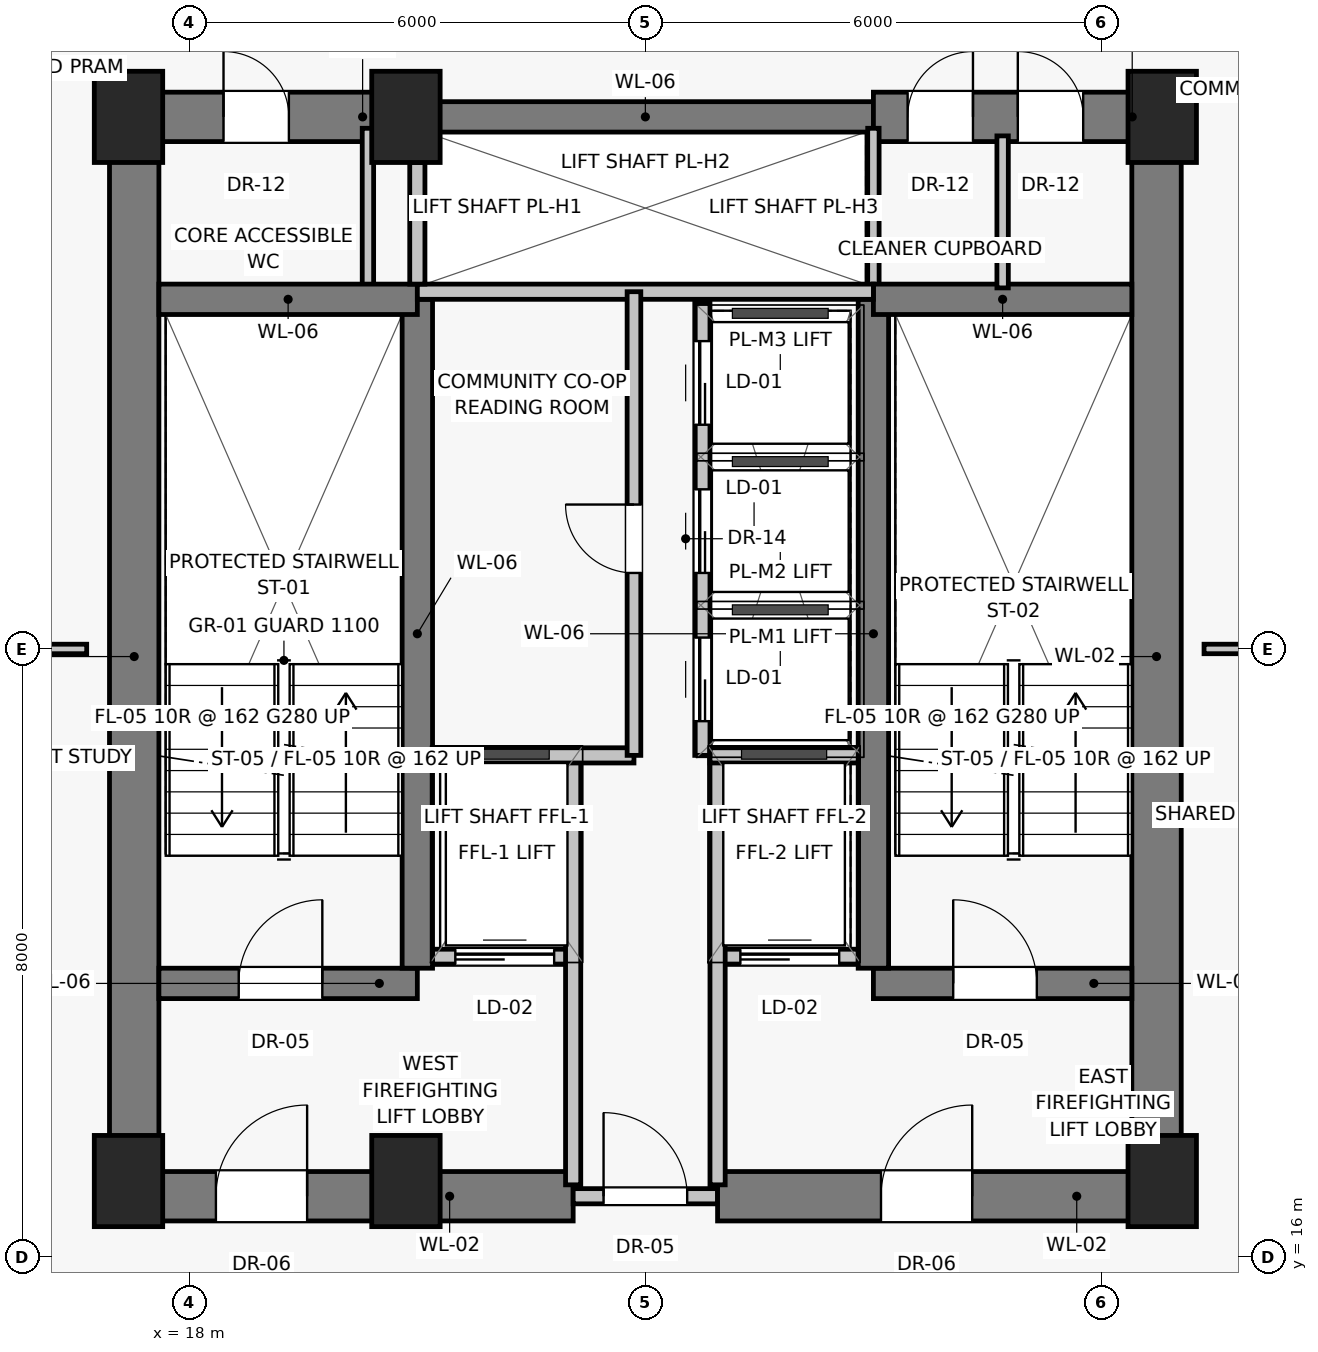
"""IFC4 building model, lengths in metres.
Left out: names, types, materials, properties, quantities, classifications, styles, units other than length and angle.
Written with IfcOpenShell. Run it as: python <this file> out.ifc"""

import sys

from ifc_helpers import new_model, si_unit, direction, frame, frame_2d, origin, origin_2d, place, context, subcontext, project, spatial, rectangle, extrude, source, transform, mapped, element, fill, save


model = new_model("IFC4")
c1 = context("Model", 3, precision=1e-05, world=origin(), true_north=direction((0.0, 1.0)))
c2 = subcontext(c1, "Body", "Model", "MODEL_VIEW")
j1 = project(units=[si_unit("LENGTHUNIT", "METRE"), si_unit("PLANEANGLEUNIT", "RADIAN")], contexts=[c1])
p1 = place(None, origin())
s1 = spatial("IfcSite", under=j1, at=p1, CompositionType="ELEMENT")
p2 = place(p1, origin())
s2 = spatial("IfcBuilding", under=s1, at=p2, CompositionType="ELEMENT")
p3 = place(p2, frame((0.0, 0.0, 163.05)))
s3 = spatial("IfcBuildingStorey", under=s2, at=p3, CompositionType="ELEMENT", Elevation=163.05)
for number, where, z_axis, x_axis in (
    (1, (17.2, 17.0, 0.0), (0.0, 0.0, 1.0), (1.0, 0.0, 0.0)),
    (2, (20.85, 17.0, 0.0), (0.0, 0.0, 1.0), (1.0, 0.0, 0.0)),
    (3, (30.8, 17.0, 0.0), (0.0, 0.0, 1.0), (1.0, 0.0, 0.0)),
    (4, (17.2, 31.0, 0.0), (0.0, 0.0, 1.0), (1.0, 0.0, 0.0)),
    (5, (20.85, 31.0, 0.0), (0.0, 0.0, 1.0), (1.0, 0.0, 0.0)),
    (6, (30.8, 31.0, 0.0), (0.0, 0.0, 1.0), (1.0, 0.0, 0.0)),
):
    element("IfcColumn", number, at=place(p3, frame(where, z_axis=z_axis, x_axis=x_axis)), inside=s3, PredefinedType="PILASTER", context=c2, shape_type="SweptSolid", body=[
        extrude(rectangle(XDim=0.9, YDim=1.2, at=origin_2d()), origin(), (0.0, 0.0, 1.0), 3.25),
    ])
for number, where, z_axis, x_axis in (
    (7, (17.275, 16.8, 0.0), (0.0, 0.0, 1.0), (0.0, 1.0, 0.0)),
    (8, (30.725, 16.8, 0.0), (0.0, 0.0, 1.0), (0.0, 1.0, 0.0)),
):
    element("IfcWall", number, at=place(p3, frame(where, z_axis=z_axis, x_axis=x_axis)), inside=s3, PredefinedType="SHEAR", context=c2, shape_type="SweptSolid", body=[
        extrude(rectangle(XDim=14.2, YDim=0.65, at=frame_2d((7.1, 0.0))), origin(), (0.0, 0.0, 1.0), 3.0),
    ])
p4 = place(p3, frame((17.2, 16.8, 0.0), z_axis=(0.0, 0.0, 1.0), x_axis=(1.0, 0.0, 0.0)))
e9 = element("IfcWall", 9, at=p4, inside=s3, PredefinedType="SHEAR", context=c2, shape_type="SweptSolid", body=[
    extrude(rectangle(XDim=5.85, YDim=0.65, at=frame_2d((2.925, 0.0))), origin(), (0.0, 0.0, 1.0), 3.0),
])
p5 = place(p4, frame((1.15, 0.0, 0.0)))
e10 = element("IfcOpeningElement", 10, at=p5, cuts=e9, PredefinedType="OPENING", context=c2, shape_type="SweptSolid", body=[
    extrude(rectangle(XDim=1.2, YDim=2.03, at=frame_2d((0.6, 1.015))), frame((0.0, 0.335, 0.0), z_axis=(0.0, -1.0, 0.0), x_axis=(1.0, 0.0, 0.0)), (0.0, 0.0, 1.0), 0.67),
])
p6 = place(p3, frame((23.05, 16.8, 0.0), z_axis=(0.0, 0.0, 1.0), x_axis=(1.0, 0.0, 0.0)))
e11 = element("IfcWall", 11, at=p6, inside=s3, PredefinedType="SOLIDWALL", context=c2, shape_type="SweptSolid", body=[
    extrude(rectangle(XDim=1.9, YDim=0.2, at=frame_2d((0.95, 0.0))), origin(), (0.0, 0.0, 1.0), 2.15),
])
p7 = place(p6, frame((0.4, 0.0, 0.0)))
e12 = element("IfcOpeningElement", 12, at=p7, cuts=e11, PredefinedType="OPENING", context=c2, shape_type="SweptSolid", body=[
    extrude(rectangle(XDim=1.1, YDim=2.03, at=frame_2d((0.55, 1.015))), frame((0.0, 0.11, 0.0), z_axis=(0.0, -1.0, 0.0), x_axis=(1.0, 0.0, 0.0)), (0.0, 0.0, 1.0), 0.22),
])
p8 = place(p3, frame((24.95, 16.8, 0.0), z_axis=(0.0, 0.0, 1.0), x_axis=(1.0, 0.0, 0.0)))
e13 = element("IfcWall", 13, at=p8, inside=s3, PredefinedType="SHEAR", context=c2, shape_type="SweptSolid", body=[
    extrude(rectangle(XDim=5.85, YDim=0.65, at=frame_2d((2.925, 0.0))), origin(), (0.0, 0.0, 1.0), 3.0),
])
p9 = place(p8, frame((2.15, 0.0, 0.0)))
e14 = element("IfcOpeningElement", 14, at=p9, cuts=e13, PredefinedType="OPENING", context=c2, shape_type="SweptSolid", body=[
    extrude(rectangle(XDim=1.2, YDim=2.03, at=frame_2d((0.6, 1.015))), frame((0.0, 0.335, 0.0), z_axis=(0.0, -1.0, 0.0), x_axis=(1.0, 0.0, 0.0)), (0.0, 0.0, 1.0), 0.67),
])
p10 = place(p3, frame((17.2, 31.0, 0.0), z_axis=(0.0, 0.0, 1.0), x_axis=(1.0, 0.0, 0.0)))
e15 = element("IfcWall", 15, at=p10, inside=s3, PredefinedType="SHEAR", context=c2, shape_type="SweptSolid", body=[
    extrude(rectangle(XDim=3.8, YDim=0.65, at=frame_2d((1.9, 0.0))), origin(), (0.0, 0.0, 1.0), 3.0),
])
p11 = place(p10, frame((1.25, 0.0, 0.0)))
e16 = element("IfcOpeningElement", 16, at=p11, cuts=e15, PredefinedType="OPENING", context=c2, shape_type="SweptSolid", body=[
    extrude(rectangle(XDim=0.86, YDim=2.01, at=frame_2d((0.43, 1.005))), frame((0.0, 0.335, 0.0), z_axis=(0.0, -1.0, 0.0), x_axis=(1.0, 0.0, 0.0)), (0.0, 0.0, 1.0), 0.67),
])
p12 = place(p3, frame((21.0, 31.0, 0.0), z_axis=(0.0, 0.0, 1.0), x_axis=(1.0, 0.0, 0.0)))
e17 = element("IfcWall", 17, at=p12, inside=s3, PredefinedType="SHEAR", context=c2, shape_type="SweptSolid", body=[
    extrude(rectangle(XDim=6.0, YDim=0.4, at=frame_2d((3.0, 0.0))), origin(), (0.0, 0.0, 1.0), 3.0),
])
p13 = place(p3, frame((27.0, 31.0, 0.0), z_axis=(0.0, 0.0, 1.0), x_axis=(1.0, 0.0, 0.0)))
e18 = element("IfcWall", 18, at=p13, inside=s3, PredefinedType="SHEAR", context=c2, shape_type="SweptSolid", body=[
    extrude(rectangle(XDim=3.8, YDim=0.65, at=frame_2d((1.9, 0.0))), origin(), (0.0, 0.0, 1.0), 3.0),
])
p14 = place(p13, frame((0.45, 0.0, 0.0)))
e19 = element("IfcOpeningElement", 19, at=p14, cuts=e18, PredefinedType="OPENING", context=c2, shape_type="SweptSolid", body=[
    extrude(rectangle(XDim=0.86, YDim=2.01, at=frame_2d((0.43, 1.005))), frame((0.0, 0.335, 0.0), z_axis=(0.0, -1.0, 0.0), x_axis=(1.0, 0.0, 0.0)), (0.0, 0.0, 1.0), 0.67),
])
p15 = place(p13, frame((1.9, 0.0, 0.0)))
e20 = element("IfcOpeningElement", 20, at=p15, cuts=e18, PredefinedType="OPENING", context=c2, shape_type="SweptSolid", body=[
    extrude(rectangle(XDim=0.86, YDim=2.01, at=frame_2d((0.43, 1.005))), frame((0.0, 0.335, 0.0), z_axis=(0.0, -1.0, 0.0), x_axis=(1.0, 0.0, 0.0)), (0.0, 0.0, 1.0), 0.67),
])
for number, where, z_axis, x_axis in (
    (21, (20.35, 28.65, 0.0), (0.0, 0.0, 1.0), (0.0, 1.0, 0.0)),
    (22, (27.0, 28.65, 0.0), (0.0, 0.0, 1.0), (0.0, 1.0, 0.0)),
):
    element("IfcWall", number, at=place(p3, frame(where, z_axis=z_axis, x_axis=x_axis)), inside=s3, PredefinedType="PARTITIONING", context=c2, shape_type="SweptSolid", body=[
        extrude(rectangle(XDim=2.2, YDim=0.15, at=frame_2d((1.1, 0.0))), origin(), (0.0, 0.0, 1.0), 3.0),
    ])
p16 = place(p3, frame((17.6, 19.6, 0.0), z_axis=(0.0, 0.0, 1.0), x_axis=(1.0, 0.0, 0.0)))
e23 = element("IfcWall", 23, at=p16, inside=s3, PredefinedType="SHEAR", context=c2, shape_type="SweptSolid", body=[
    extrude(rectangle(XDim=3.4, YDim=0.4, at=frame_2d((1.7, 0.0))), origin(), (0.0, 0.0, 1.0), 3.0),
])
p17 = place(p16, frame((1.05, 0.0, 0.0)))
e24 = element("IfcOpeningElement", 24, at=p17, cuts=e23, PredefinedType="OPENING", context=c2, shape_type="SweptSolid", body=[
    extrude(rectangle(XDim=1.1, YDim=2.03, at=frame_2d((0.55, 1.015))), frame((0.0, 0.21, 0.0), z_axis=(0.0, -1.0, 0.0), x_axis=(1.0, 0.0, 0.0)), (0.0, 0.0, 1.0), 0.42),
])
p18 = place(p3, frame((21.2, 19.95, 0.0), z_axis=(0.0, 0.0, 1.0), x_axis=(1.0, 0.0, 0.0)))
e25 = element("IfcWall", 25, at=p18, inside=s3, PredefinedType="SOLIDWALL", context=c2, shape_type="SweptSolid", body=[
    extrude(rectangle(XDim=1.85, YDim=0.2, at=frame_2d((0.925, 0.0))), origin(), (0.0, 0.0, 1.0), 3.0),
])
p19 = place(p18, frame((0.3, 0.0, 0.0)))
e26 = element("IfcOpeningElement", 26, at=p19, cuts=e25, PredefinedType="OPENING", context=c2, shape_type="SweptSolid", body=[
    extrude(rectangle(XDim=1.3, YDim=2.25, at=frame_2d((0.65, 1.125))), frame((0.0, 0.11, 0.0), z_axis=(0.0, -1.0, 0.0), x_axis=(1.0, 0.0, 0.0)), (0.0, 0.0, 1.0), 0.22),
])
p20 = place(p3, frame((24.95, 19.95, 0.0), z_axis=(0.0, 0.0, 1.0), x_axis=(1.0, 0.0, 0.0)))
e27 = element("IfcWall", 27, at=p20, inside=s3, PredefinedType="SOLIDWALL", context=c2, shape_type="SweptSolid", body=[
    extrude(rectangle(XDim=1.85, YDim=0.2, at=frame_2d((0.925, 0.0))), origin(), (0.0, 0.0, 1.0), 3.0),
])
p21 = place(p20, frame((0.3, 0.0, 0.0)))
e28 = element("IfcOpeningElement", 28, at=p21, cuts=e27, PredefinedType="OPENING", context=c2, shape_type="SweptSolid", body=[
    extrude(rectangle(XDim=1.3, YDim=2.25, at=frame_2d((0.65, 1.125))), frame((0.0, 0.11, 0.0), z_axis=(0.0, -1.0, 0.0), x_axis=(1.0, 0.0, 0.0)), (0.0, 0.0, 1.0), 0.22),
])
p22 = place(p3, frame((27.0, 19.6, 0.0), z_axis=(0.0, 0.0, 1.0), x_axis=(1.0, 0.0, 0.0)))
e29 = element("IfcWall", 29, at=p22, inside=s3, PredefinedType="SHEAR", context=c2, shape_type="SweptSolid", body=[
    extrude(rectangle(XDim=3.4, YDim=0.4, at=frame_2d((1.7, 0.0))), origin(), (0.0, 0.0, 1.0), 3.0),
])
p23 = place(p22, frame((1.05, 0.0, 0.0)))
e30 = element("IfcOpeningElement", 30, at=p23, cuts=e29, PredefinedType="OPENING", context=c2, shape_type="SweptSolid", body=[
    extrude(rectangle(XDim=1.1, YDim=2.03, at=frame_2d((0.55, 1.015))), frame((0.0, 0.21, 0.0), z_axis=(0.0, -1.0, 0.0), x_axis=(1.0, 0.0, 0.0)), (0.0, 0.0, 1.0), 0.42),
])
for number, where, z_axis, x_axis in (
    (31, (21.0, 19.8, 0.0), (0.0, 0.0, 1.0), (0.0, 1.0, 0.0)),
    (32, (27.0, 19.8, 0.0), (0.0, 0.0, 1.0), (0.0, 1.0, 0.0)),
):
    element("IfcWall", number, at=place(p3, frame(where, z_axis=z_axis, x_axis=x_axis)), inside=s3, PredefinedType="SHEAR", context=c2, shape_type="SweptSolid", body=[
        extrude(rectangle(XDim=8.8, YDim=0.4, at=frame_2d((4.4, 0.0))), origin(), (0.0, 0.0, 1.0), 3.0),
    ])
for number, where, z_axis, x_axis in (
    (33, (17.6, 28.6, 0.0), (0.0, 0.0, 1.0), (1.0, 0.0, 0.0)),
    (34, (27.0, 28.6, 0.0), (0.0, 0.0, 1.0), (1.0, 0.0, 0.0)),
):
    element("IfcWall", number, at=place(p3, frame(where, z_axis=z_axis, x_axis=x_axis)), inside=s3, PredefinedType="SHEAR", context=c2, shape_type="SweptSolid", body=[
        extrude(rectangle(XDim=3.4, YDim=0.4, at=frame_2d((1.7, 0.0))), origin(), (0.0, 0.0, 1.0), 3.0),
    ])
for number, where, z_axis, x_axis in (
    (35, (23.05, 16.95, 0.0), (0.0, 0.0, 1.0), (0.0, 1.0, 0.0)),
    (36, (24.95, 16.95, 0.0), (0.0, 0.0, 1.0), (0.0, 1.0, 0.0)),
):
    element("IfcWall", number, at=place(p3, frame(where, z_axis=z_axis, x_axis=x_axis)), inside=s3, PredefinedType="SOLIDWALL", context=c2, shape_type="SweptSolid", body=[
        extrude(rectangle(XDim=5.6, YDim=0.2, at=frame_2d((2.8, 0.0))), origin(), (0.0, 0.0, 1.0), 3.0),
    ])
p24 = place(p3, frame((21.2, 22.6, 0.0), z_axis=(0.0, 0.0, 1.0), x_axis=(1.0, 0.0, 0.0)))
e37 = element("IfcWall", 37, at=p24, inside=s3, PredefinedType="SOLIDWALL", context=c2, shape_type="SweptSolid", body=[
    extrude(rectangle(XDim=2.65, YDim=0.2, at=frame_2d((1.325, 0.0))), origin(), (0.0, 0.0, 1.0), 3.0),
])
p25 = place(p3, frame((24.85, 22.6, 0.0), z_axis=(0.0, 0.0, 1.0), x_axis=(1.0, 0.0, 0.0)))
e38 = element("IfcWall", 38, at=p25, inside=s3, PredefinedType="SOLIDWALL", context=c2, shape_type="SweptSolid", body=[
    extrude(rectangle(XDim=1.95, YDim=0.2, at=frame_2d((0.975, 0.0))), origin(), (0.0, 0.0, 1.0), 3.0),
])
p26 = place(p3, frame((21.0, 28.7, 0.0), z_axis=(0.0, 0.0, 1.0), x_axis=(1.0, 0.0, 0.0)))
e39 = element("IfcWall", 39, at=p26, inside=s3, PredefinedType="SOLIDWALL", context=c2, shape_type="SweptSolid", body=[
    extrude(rectangle(XDim=6.0, YDim=0.2, at=frame_2d((3.0, 0.0))), origin(), (0.0, 0.0, 1.0), 3.0),
])
p27 = place(p3, frame((21.0, 28.8, 0.0), z_axis=(0.0, 0.0, 1.0), x_axis=(0.0, 1.0, 0.0)))
e40 = element("IfcWall", 40, at=p27, inside=s3, PredefinedType="SOLIDWALL", context=c2, shape_type="SweptSolid", body=[
    extrude(rectangle(XDim=1.6, YDim=0.2, at=frame_2d((0.8, 0.0))), origin(), (0.0, 0.0, 1.0), 3.0),
])
p28 = place(p3, frame((23.85, 22.6, 0.0), z_axis=(0.0, 0.0, 1.0), x_axis=(0.0, 1.0, 0.0)))
e41 = element("IfcWall", 41, at=p28, inside=s3, PredefinedType="PARTITIONING", context=c2, shape_type="SweptSolid", body=[
    extrude(rectangle(XDim=6.1, YDim=0.18, at=frame_2d((3.05, 0.0))), origin(), (0.0, 0.0, 1.0), 3.0),
])
p29 = place(p28, frame((2.4, 0.0, 0.0)))
e42 = element("IfcOpeningElement", 42, at=p29, cuts=e41, PredefinedType="OPENING", context=c2, shape_type="SweptSolid", body=[
    extrude(rectangle(XDim=0.9, YDim=2.01, at=frame_2d((0.45, 1.005))), frame((0.0, 0.1, 0.0), z_axis=(0.0, -1.0, 0.0), x_axis=(1.0, 0.0, 0.0)), (0.0, 0.0, 1.0), 0.2),
])
p30 = place(p3, frame((24.75, 22.6, 0.0), z_axis=(0.0, 0.0, 1.0), x_axis=(0.0, 1.0, 0.0)))
e43 = element("IfcWall", 43, at=p30, inside=s3, PredefinedType="SOLIDWALL", context=c2, shape_type="SweptSolid", body=[
    extrude(rectangle(XDim=5.95, YDim=0.2, at=frame_2d((2.975, 0.0))), origin(), (0.0, 0.0, 1.0), 3.0),
])
p31 = place(p30, frame((0.45, 0.0, 0.0)))
e44 = element("IfcOpeningElement", 44, at=p31, cuts=e43, PredefinedType="OPENING", context=c2, shape_type="SweptSolid", body=[
    extrude(rectangle(XDim=1.1, YDim=2.08, at=frame_2d((0.55, 1.04))), frame((0.0, 0.11, 0.0), z_axis=(0.0, -1.0, 0.0), x_axis=(1.0, 0.0, 0.0)), (0.0, 0.0, 1.0), 0.22),
])
p32 = place(p30, frame((2.4, 0.0, 0.0)))
e45 = element("IfcOpeningElement", 45, at=p32, cuts=e43, PredefinedType="OPENING", context=c2, shape_type="SweptSolid", body=[
    extrude(rectangle(XDim=1.1, YDim=2.08, at=frame_2d((0.55, 1.04))), frame((0.0, 0.11, 0.0), z_axis=(0.0, -1.0, 0.0), x_axis=(1.0, 0.0, 0.0)), (0.0, 0.0, 1.0), 0.22),
])
p33 = place(p30, frame((4.35, 0.0, 0.0)))
e46 = element("IfcOpeningElement", 46, at=p33, cuts=e43, PredefinedType="OPENING", context=c2, shape_type="SweptSolid", body=[
    extrude(rectangle(XDim=1.1, YDim=2.08, at=frame_2d((0.55, 1.04))), frame((0.0, 0.11, 0.0), z_axis=(0.0, -1.0, 0.0), x_axis=(1.0, 0.0, 0.0)), (0.0, 0.0, 1.0), 0.22),
])
p34 = place(p3, frame((28.7, 28.75, 0.0), z_axis=(0.0, 0.0, 1.0), x_axis=(0.0, 1.0, 0.0)))
e47 = element("IfcWall", 47, at=p34, inside=s3, PredefinedType="PARTITIONING", context=c2, shape_type="SweptSolid", body=[
    extrude(rectangle(XDim=2.0, YDim=0.15, at=frame_2d((1.0, 0.0))), origin(), (0.0, 0.0, 1.0), 3.0),
])
for number, where, z_axis, x_axis in (
    (48, (14.55, 24.0, 0.0), (0.0, 0.0, 1.0), (1.0, 0.0, 0.0)),
    (49, (31.35, 24.0, 0.0), (0.0, 0.0, 1.0), (1.0, 0.0, 0.0)),
):
    element("IfcWall", number, at=place(p3, frame(where, z_axis=z_axis, x_axis=x_axis)), inside=s3, PredefinedType="PARTITIONING", context=c2, shape_type="SweptSolid", body=[
        extrude(rectangle(XDim=2.1, YDim=0.125, at=frame_2d((1.05, 0.0))), origin(), (0.0, 0.0, 1.0), 3.0),
    ])
m1 = source(origin(), c2, "Body", "SweptSolid", [
    extrude(rectangle(XDim=1.2, YDim=2.03, at=frame_2d((0.6, 1.015))), frame((0.0, 0.025, 0.0), z_axis=(0.0, -1.0, 0.0), x_axis=(1.0, 0.0, 0.0)), (0.0, 0.0, 1.0), 0.05),
])
p35 = place(p5, origin())
e50 = element("IfcDoor", 50, at=p35, inside=s3, OperationType="SINGLE_SWING_RIGHT", PredefinedType="DOOR", context=c2, shape_type="MappedRepresentation", body=[
    mapped(m1, transform((0.0, 0.0, 0.0), scale=1.0)),
])
fill(e10, e50)
m2 = source(origin(), c2, "Body", "SweptSolid", [
    extrude(rectangle(XDim=1.1, YDim=2.03, at=frame_2d((0.55, 1.015))), frame((0.0, 0.025, 0.0), z_axis=(0.0, -1.0, 0.0), x_axis=(1.0, 0.0, 0.0)), (0.0, 0.0, 1.0), 0.05),
])
p36 = place(p7, origin())
e51 = element("IfcDoor", 51, at=p36, inside=s3, OperationType="SINGLE_SWING_LEFT", PredefinedType="DOOR", context=c2, shape_type="MappedRepresentation", body=[
    mapped(m2, transform((0.0, 0.0, 0.0), scale=1.0)),
])
fill(e12, e51)
p37 = place(p9, origin())
e52 = element("IfcDoor", 52, at=p37, inside=s3, OperationType="SINGLE_SWING_RIGHT", PredefinedType="DOOR", context=c2, shape_type="MappedRepresentation", body=[
    mapped(m1, transform((0.0, 0.0, 0.0), scale=1.0)),
])
fill(e14, e52)
m3 = source(origin(), c2, "Body", "SweptSolid", [
    extrude(rectangle(XDim=0.86, YDim=2.01, at=frame_2d((0.43, 1.005))), frame((0.0, 0.025, 0.0), z_axis=(0.0, -1.0, 0.0), x_axis=(1.0, 0.0, 0.0)), (0.0, 0.0, 1.0), 0.05),
])
p38 = place(p11, origin())
e53 = element("IfcDoor", 53, at=p38, inside=s3, OperationType="SINGLE_SWING_LEFT", PredefinedType="DOOR", context=c2, shape_type="MappedRepresentation", body=[
    mapped(m3, transform((0.0, 0.0, 0.0), scale=1.0)),
])
fill(e16, e53)
p39 = place(p14, origin())
e54 = element("IfcDoor", 54, at=p39, inside=s3, OperationType="SINGLE_SWING_RIGHT", PredefinedType="DOOR", context=c2, shape_type="MappedRepresentation", body=[
    mapped(m3, transform((0.0, 0.0, 0.0), scale=1.0)),
])
fill(e19, e54)
p40 = place(p15, origin())
e55 = element("IfcDoor", 55, at=p40, inside=s3, OperationType="SINGLE_SWING_LEFT", PredefinedType="DOOR", context=c2, shape_type="MappedRepresentation", body=[
    mapped(m3, transform((0.0, 0.0, 0.0), scale=1.0)),
])
fill(e20, e55)
p41 = place(p17, origin())
e56 = element("IfcDoor", 56, at=p41, inside=s3, OperationType="SINGLE_SWING_RIGHT", PredefinedType="DOOR", context=c2, shape_type="MappedRepresentation", body=[
    mapped(m2, transform((0.0, 0.0, 0.0), scale=1.0)),
])
fill(e24, e56)
m4 = source(origin(), c2, "Body", "SweptSolid", [
    extrude(rectangle(XDim=1.3, YDim=2.25, at=frame_2d((0.65, 1.125))), frame((0.0, 0.025, 0.0), z_axis=(0.0, -1.0, 0.0), x_axis=(1.0, 0.0, 0.0)), (0.0, 0.0, 1.0), 0.05),
])
p42 = place(p19, origin())
e57 = element("IfcDoor", 57, at=p42, inside=s3, OperationType="SLIDING_TO_LEFT", PredefinedType="DOOR", context=c2, shape_type="MappedRepresentation", body=[
    mapped(m4, transform((0.0, 0.0, 0.0), scale=1.0)),
])
fill(e26, e57)
p43 = place(p21, origin())
e58 = element("IfcDoor", 58, at=p43, inside=s3, OperationType="SLIDING_TO_LEFT", PredefinedType="DOOR", context=c2, shape_type="MappedRepresentation", body=[
    mapped(m4, transform((0.0, 0.0, 0.0), scale=1.0)),
])
fill(e28, e58)
p44 = place(p23, origin())
e59 = element("IfcDoor", 59, at=p44, inside=s3, OperationType="SINGLE_SWING_LEFT", PredefinedType="DOOR", context=c2, shape_type="MappedRepresentation", body=[
    mapped(m2, transform((0.0, 0.0, 0.0), scale=1.0)),
])
fill(e30, e59)
m5 = source(origin(), c2, "Body", "SweptSolid", [
    extrude(rectangle(XDim=0.9, YDim=2.01, at=frame_2d((0.45, 1.005))), frame((0.0, 0.025, 0.0), z_axis=(0.0, -1.0, 0.0), x_axis=(1.0, 0.0, 0.0)), (0.0, 0.0, 1.0), 0.05),
])
p45 = place(p29, origin())
e60 = element("IfcDoor", 60, at=p45, inside=s3, OperationType="SINGLE_SWING_RIGHT", PredefinedType="DOOR", context=c2, shape_type="MappedRepresentation", body=[
    mapped(m5, transform((0.0, 0.0, 0.0), scale=1.0)),
])
fill(e42, e60)
m6 = source(origin(), c2, "Body", "SweptSolid", [
    extrude(rectangle(XDim=1.1, YDim=2.08, at=frame_2d((0.55, 1.04))), frame((0.0, 0.025, 0.0), z_axis=(0.0, -1.0, 0.0), x_axis=(1.0, 0.0, 0.0)), (0.0, 0.0, 1.0), 0.05),
])
p46 = place(p31, origin())
e61 = element("IfcDoor", 61, at=p46, inside=s3, OperationType="SLIDING_TO_LEFT", PredefinedType="DOOR", context=c2, shape_type="MappedRepresentation", body=[
    mapped(m6, transform((0.0, 0.0, 0.0), scale=1.0)),
])
fill(e44, e61)
p47 = place(p32, origin())
e62 = element("IfcDoor", 62, at=p47, inside=s3, OperationType="SLIDING_TO_LEFT", PredefinedType="DOOR", context=c2, shape_type="MappedRepresentation", body=[
    mapped(m6, transform((0.0, 0.0, 0.0), scale=1.0)),
])
fill(e45, e62)
p48 = place(p33, origin())
e63 = element("IfcDoor", 63, at=p48, inside=s3, OperationType="SLIDING_TO_LEFT", PredefinedType="DOOR", context=c2, shape_type="MappedRepresentation", body=[
    mapped(m6, transform((0.0, 0.0, 0.0), scale=1.0)),
])
fill(e46, e63)
save(model, sys.argv[1])
